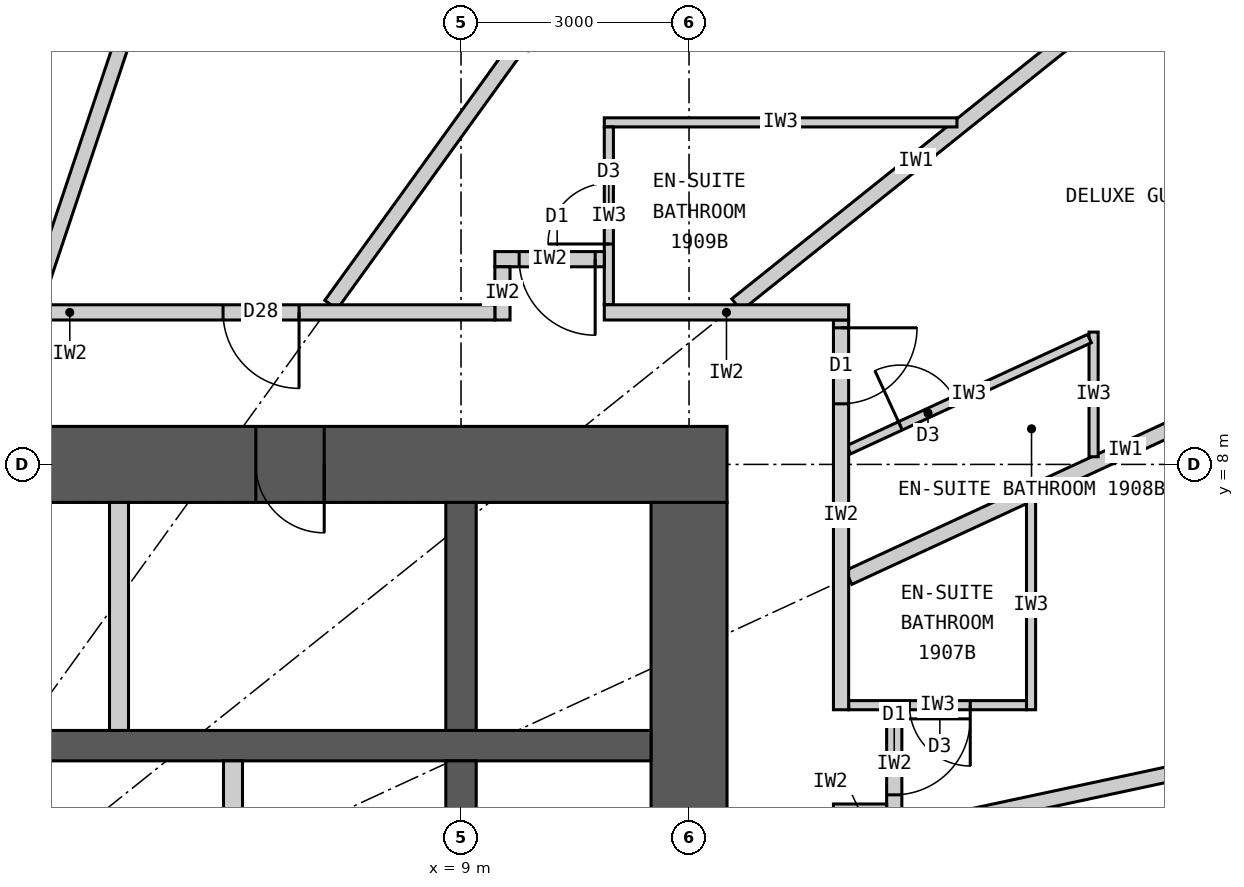
"""IFC4 building model, lengths in metres.
Left out: names, types, materials, properties, quantities, classifications, styles, units other than length and angle.
Written with IfcOpenShell. Run it as: python <this file> out.ifc"""

import sys

from ifc_helpers import new_model, si_unit, direction, frame, frame_2d, origin, place, context, subcontext, project, spatial, rectangle, extrude, element, fill, save


model = new_model("IFC4")
c1 = context("Model", 3, precision=1e-05, world=origin(), true_north=direction((0.0, 1.0)))
c2 = subcontext(c1, "Body", "Model", "MODEL_VIEW")
j1 = project(units=[si_unit("LENGTHUNIT", "METRE"), si_unit("PLANEANGLEUNIT", "RADIAN")], contexts=[c1])
p1 = place(None, origin())
s1 = spatial("IfcSite", under=j1, at=p1, CompositionType="ELEMENT")
p2 = place(p1, origin())
s2 = spatial("IfcBuilding", under=s1, at=p2, CompositionType="ELEMENT")
p3 = place(p2, frame((0.0, 0.0, 77.1)))
s3 = spatial("IfcBuildingStorey", under=s2, at=p3, CompositionType="ELEMENT", Elevation=77.1)
p4 = place(p3, frame((-12.5, 8.0, 0.0), z_axis=(0.0, 0.0, 1.0), x_axis=(1.0, 0.0, 0.0)))
e1 = element("IfcWall", 1, at=p4, inside=s3, PredefinedType="SHEAR", context=c2, shape_type="SweptSolid", body=[
    extrude(rectangle(XDim=25.0, YDim=1.0, at=frame_2d((12.5, 0.0))), origin(), (0.0, 0.0, 1.0), 3.3),
])
p5 = place(p4, frame((11.2, 0.0, 0.0)))
e2 = element("IfcOpeningElement", 2, at=p5, cuts=e1, PredefinedType="OPENING", context=c2, shape_type="SweptSolid", body=[
    extrude(rectangle(XDim=1.2, YDim=2.2, at=frame_2d((0.6, 1.1))), frame((0.0, 0.51, 0.0), z_axis=(0.0, -1.0, 0.0), x_axis=(1.0, 0.0, 0.0)), (0.0, 0.0, 1.0), 1.02),
])
p6 = place(p4, frame((18.8, 0.0, 0.0)))
e3 = element("IfcOpeningElement", 3, at=p6, cuts=e1, PredefinedType="OPENING", context=c2, shape_type="SweptSolid", body=[
    extrude(rectangle(XDim=0.9, YDim=2.2, at=frame_2d((0.45, 1.1))), frame((0.0, 0.51, 0.0), z_axis=(0.0, -1.0, 0.0), x_axis=(1.0, 0.0, 0.0)), (0.0, 0.0, 1.0), 1.02),
])
p7 = place(p3, frame((12.0, -7.5, 0.0), z_axis=(0.0, 0.0, 1.0), x_axis=(0.0, 1.0, 0.0)))
e4 = element("IfcWall", 4, at=p7, inside=s3, PredefinedType="SHEAR", context=c2, shape_type="SweptSolid", body=[
    extrude(rectangle(XDim=15.0, YDim=1.0, at=frame_2d((7.5, 0.0))), origin(), (0.0, 0.0, 1.0), 3.3),
])
p8 = place(p7, frame((6.6, 0.0, 0.0)))
e5 = element("IfcOpeningElement", 5, at=p8, cuts=e4, PredefinedType="OPENING", context=c2, shape_type="SweptSolid", body=[
    extrude(rectangle(XDim=1.8, YDim=2.2, at=frame_2d((0.9, 1.1))), frame((0.0, 0.51, 0.0), z_axis=(0.0, -1.0, 0.0), x_axis=(1.0, 0.0, 0.0)), (0.0, 0.0, 1.0), 1.02),
])
p9 = place(p3, frame((-11.5, 4.3, 0.0), z_axis=(0.0, 0.0, 1.0), x_axis=(1.0, 0.0, 0.0)))
e6 = element("IfcWall", 6, at=p9, inside=s3, PredefinedType="SHEAR", context=c2, shape_type="SweptSolid", body=[
    extrude(rectangle(XDim=23.0, YDim=0.4, at=frame_2d((11.5, 0.0))), origin(), (0.0, 0.0, 1.0), 3.3),
])
p10 = place(p3, frame((9.0, 4.5, 0.0), z_axis=(0.0, 0.0, 1.0), x_axis=(0.0, 1.0, 0.0)))
e7 = element("IfcWall", 7, at=p10, inside=s3, PredefinedType="SHEAR", context=c2, shape_type="SweptSolid", body=[
    extrude(rectangle(XDim=3.0, YDim=0.4, at=frame_2d((1.5, 0.0))), origin(), (0.0, 0.0, 1.0), 3.3),
])
p11 = place(p3, frame((9.0, 1.75, 0.0), z_axis=(0.0, 0.0, 1.0), x_axis=(0.0, 1.0, 0.0)))
e8 = element("IfcWall", 8, at=p11, inside=s3, PredefinedType="SHEAR", context=c2, shape_type="SweptSolid", body=[
    extrude(rectangle(XDim=2.35, YDim=0.4, at=frame_2d((1.175, 0.0))), origin(), (0.0, 0.0, 1.0), 3.3),
])
p12 = place(p3, frame((4.5, 4.5, 0.0), z_axis=(0.0, 0.0, 1.0), x_axis=(0.0, 1.0, 0.0)))
e9 = element("IfcWall", 9, at=p12, inside=s3, PredefinedType="PARTITIONING", context=c2, shape_type="SweptSolid", body=[
    extrude(rectangle(XDim=3.0, YDim=0.25, at=frame_2d((1.5, 0.0))), origin(), (0.0, 0.0, 1.0), 3.3),
])
p13 = place(p3, frame((6.0, 1.75, 0.0), z_axis=(0.0, 0.0, 1.0), x_axis=(0.0, 1.0, 0.0)))
e10 = element("IfcWall", 10, at=p13, inside=s3, PredefinedType="PARTITIONING", context=c2, shape_type="SweptSolid", body=[
    extrude(rectangle(XDim=2.35, YDim=0.25, at=frame_2d((1.175, 0.0))), origin(), (0.0, 0.0, 1.0), 3.3),
])
p14 = place(p3, frame((14.1, 3.022, 0.0), z_axis=(0.0, 0.0, 1.0), x_axis=(0.977790014929, 0.209586943072, 0.0)))
e11 = element("IfcWall", 11, at=p14, inside=s3, PredefinedType="PARTITIONING", context=c2, shape_type="SweptSolid", body=[
    extrude(rectangle(XDim=10.087, YDim=0.2, at=frame_2d((5.043, 0.0))), origin(), (0.0, 0.0, 1.0), 2.32),
])
p15 = place(p3, frame((14.1, 6.512, 0.0), z_axis=(0.0, 0.0, 1.0), x_axis=(0.907832871056, 0.419332181247, 0.0)))
e12 = element("IfcWall", 12, at=p15, inside=s3, PredefinedType="PARTITIONING", context=c2, shape_type="SweptSolid", body=[
    extrude(rectangle(XDim=8.023, YDim=0.2, at=frame_2d((4.011, 0.0))), origin(), (0.0, 0.0, 1.0), 2.32),
])
p16 = place(p3, frame((12.625, 10.1, 0.0), z_axis=(0.0, 0.0, 1.0), x_axis=(0.780892451574, 0.624665493744, 0.0)))
e13 = element("IfcWall", 13, at=p16, inside=s3, PredefinedType="PARTITIONING", context=c2, shape_type="SweptSolid", body=[
    extrude(rectangle(XDim=6.045, YDim=0.2, at=frame_2d((3.022, 0.0))), origin(), (0.0, 0.0, 1.0), 2.32),
])
p17 = place(p3, frame((7.289, 10.1, 0.0), z_axis=(0.0, 0.0, 1.0), x_axis=(0.585198353053, 0.810890182197, 0.0)))
e14 = element("IfcWall", 14, at=p17, inside=s3, PredefinedType="PARTITIONING", context=c2, shape_type="SweptSolid", body=[
    extrude(rectangle(XDim=8.36, YDim=0.2, at=frame_2d((4.18, 0.0))), origin(), (0.0, 0.0, 1.0), 2.32),
])
p18 = place(p3, frame((3.383, 10.1, 0.0), z_axis=(0.0, 0.0, 1.0), x_axis=(0.31759592231, 0.948226149256, 0.0)))
e15 = element("IfcWall", 15, at=p18, inside=s3, PredefinedType="PARTITIONING", context=c2, shape_type="SweptSolid", body=[
    extrude(rectangle(XDim=9.098, YDim=0.2, at=frame_2d((4.549, 0.0))), origin(), (0.0, 0.0, 1.0), 2.32),
])
p19 = place(p3, frame((16.5, 7.521, 0.0), z_axis=(0.0, 0.0, 1.0), x_axis=(0.0, -1.0, 0.0)))
e16 = element("IfcWall", 16, at=p19, inside=s3, PredefinedType="PARTITIONING", context=c2, shape_type="SweptSolid", body=[
    extrude(rectangle(XDim=2.749, YDim=0.12, at=frame_2d((1.374, 0.0))), origin(), (0.0, 0.0, 1.0), 3.12),
])
p20 = place(p3, frame((14.1, 4.833, 0.0), z_axis=(0.0, 0.0, 1.0), x_axis=(1.0, 0.0, 0.0)))
e17 = element("IfcWall", 17, at=p20, inside=s3, PredefinedType="PARTITIONING", context=c2, shape_type="SweptSolid", body=[
    extrude(rectangle(XDim=2.34, YDim=0.12, at=frame_2d((1.17, 0.0))), origin(), (0.0, 0.0, 1.0), 3.12),
])
p21 = place(p20, frame((0.8, 0.0, 0.0)))
e18 = element("IfcOpeningElement", 18, at=p21, cuts=e17, PredefinedType="OPENING", context=c2, shape_type="SweptSolid", body=[
    extrude(rectangle(XDim=0.8, YDim=2.1, at=frame_2d((0.4, 1.05))), frame((0.0, 0.07, 0.0), z_axis=(0.0, -1.0, 0.0), x_axis=(1.0, 0.0, 0.0)), (0.0, 0.0, 1.0), 0.14),
])
p22 = place(p3, frame((17.323, 8.101, 0.0), z_axis=(0.0, 0.0, 1.0), x_axis=(0.0, 1.0, 0.0)))
e19 = element("IfcWall", 19, at=p22, inside=s3, PredefinedType="PARTITIONING", context=c2, shape_type="SweptSolid", body=[
    extrude(rectangle(XDim=1.64, YDim=0.12, at=frame_2d((0.82, 0.0))), origin(), (0.0, 0.0, 1.0), 3.12),
])
p23 = place(p3, frame((14.1, 8.193, 0.0), z_axis=(0.0, 0.0, 1.0), x_axis=(0.907836493557, 0.419324338628, 0.0)))
e20 = element("IfcWall", 20, at=p23, inside=s3, PredefinedType="PARTITIONING", context=c2, shape_type="SweptSolid", body=[
    extrude(rectangle(XDim=3.49, YDim=0.12, at=frame_2d((1.745, 0.0))), origin(), (0.0, 0.0, 1.0), 3.12),
])
p24 = place(p23, frame((0.75, 0.0, 0.0)))
e21 = element("IfcOpeningElement", 21, at=p24, cuts=e20, PredefinedType="OPENING", context=c2, shape_type="SweptSolid", body=[
    extrude(rectangle(XDim=0.8, YDim=2.1, at=frame_2d((0.4, 1.05))), frame((0.0, 0.07, 0.0), z_axis=(0.0, -1.0, 0.0), x_axis=(1.0, 0.0, 0.0)), (0.0, 0.0, 1.0), 0.14),
])
p25 = place(p3, frame((15.525, 12.5, 0.0), z_axis=(0.0, 0.0, 1.0), x_axis=(-1.0, 0.0, 0.0)))
e22 = element("IfcWall", 22, at=p25, inside=s3, PredefinedType="PARTITIONING", context=c2, shape_type="SweptSolid", body=[
    extrude(rectangle(XDim=4.64, YDim=0.12, at=frame_2d((2.32, 0.0))), origin(), (0.0, 0.0, 1.0), 3.12),
])
p26 = place(p3, frame((10.945, 10.1, 0.0), z_axis=(0.0, 0.0, 1.0), x_axis=(0.0, 1.0, 0.0)))
e23 = element("IfcWall", 23, at=p26, inside=s3, PredefinedType="PARTITIONING", context=c2, shape_type="SweptSolid", body=[
    extrude(rectangle(XDim=2.34, YDim=0.12, at=frame_2d((1.17, 0.0))), origin(), (0.0, 0.0, 1.0), 3.12),
])
p27 = place(p26, frame((0.8, 0.0, 0.0)))
e24 = element("IfcOpeningElement", 24, at=p27, cuts=e23, PredefinedType="OPENING", context=c2, shape_type="SweptSolid", body=[
    extrude(rectangle(XDim=0.8, YDim=2.1, at=frame_2d((0.4, 1.05))), frame((0.0, 0.07, 0.0), z_axis=(0.0, -1.0, 0.0), x_axis=(1.0, 0.0, 0.0)), (0.0, 0.0, 1.0), 0.14),
])
p28 = place(p3, frame((14.7, 3.333, 0.0), z_axis=(0.0, 0.0, 1.0), x_axis=(0.0, 1.0, 0.0)))
e25 = element("IfcWall", 25, at=p28, inside=s3, PredefinedType="PARTITIONING", context=c2, shape_type="SweptSolid", body=[
    extrude(rectangle(XDim=1.44, YDim=0.2, at=frame_2d((0.72, 0.0))), origin(), (0.0, 0.0, 1.0), 3.12),
])
p29 = place(p28, frame((0.32, 0.0, 0.0)))
e26 = element("IfcOpeningElement", 26, at=p29, cuts=e25, PredefinedType="OPENING", context=c2, shape_type="SweptSolid", body=[
    extrude(rectangle(XDim=1.0, YDim=2.2, at=frame_2d((0.5, 1.1))), frame((0.0, 0.11, 0.0), z_axis=(0.0, -1.0, 0.0), x_axis=(1.0, 0.0, 0.0)), (0.0, 0.0, 1.0), 0.22),
])
p30 = place(p3, frame((13.9, 3.433, 0.0), z_axis=(0.0, 0.0, 1.0), x_axis=(1.0, 0.0, 0.0)))
e27 = element("IfcWall", 27, at=p30, inside=s3, PredefinedType="PARTITIONING", context=c2, shape_type="SweptSolid", body=[
    extrude(rectangle(XDim=0.7, YDim=0.2, at=frame_2d((0.35, 0.0))), origin(), (0.0, 0.0, 1.0), 2.32),
])
p31 = place(p3, frame((9.445, 10.7, 0.0), z_axis=(0.0, 0.0, 1.0), x_axis=(1.0, 0.0, 0.0)))
e28 = element("IfcWall", 28, at=p31, inside=s3, PredefinedType="PARTITIONING", context=c2, shape_type="SweptSolid", body=[
    extrude(rectangle(XDim=1.44, YDim=0.2, at=frame_2d((0.72, 0.0))), origin(), (0.0, 0.0, 1.0), 3.12),
])
p32 = place(p31, frame((0.32, 0.0, 0.0)))
e29 = element("IfcOpeningElement", 29, at=p32, cuts=e28, PredefinedType="OPENING", context=c2, shape_type="SweptSolid", body=[
    extrude(rectangle(XDim=1.0, YDim=2.2, at=frame_2d((0.5, 1.1))), frame((0.0, 0.11, 0.0), z_axis=(0.0, -1.0, 0.0), x_axis=(1.0, 0.0, 0.0)), (0.0, 0.0, 1.0), 0.22),
])
p33 = place(p3, frame((9.545, 9.9, 0.0), z_axis=(0.0, 0.0, 1.0), x_axis=(0.0, 1.0, 0.0)))
e30 = element("IfcWall", 30, at=p33, inside=s3, PredefinedType="PARTITIONING", context=c2, shape_type="SweptSolid", body=[
    extrude(rectangle(XDim=0.7, YDim=0.2, at=frame_2d((0.35, 0.0))), origin(), (0.0, 0.0, 1.0), 3.12),
])
p34 = place(p3, frame((14.0, 4.772, 0.0), z_axis=(0.0, 0.0, 1.0), x_axis=(0.0, 1.0, 0.0)))
e31 = element("IfcWall", 31, at=p34, inside=s3, PredefinedType="PARTITIONING", context=c2, shape_type="SweptSolid", body=[
    extrude(rectangle(XDim=5.127, YDim=0.2, at=frame_2d((2.564, 0.0))), origin(), (0.0, 0.0, 1.0), 3.12),
])
p35 = place(p34, frame((4.025, 0.0, 0.0)))
e32 = element("IfcOpeningElement", 32, at=p35, cuts=e31, PredefinedType="OPENING", context=c2, shape_type="SweptSolid", body=[
    extrude(rectangle(XDim=1.0, YDim=2.2, at=frame_2d((0.5, 1.1))), frame((0.0, 0.11, 0.0), z_axis=(0.0, -1.0, 0.0), x_axis=(1.0, 0.0, 0.0)), (0.0, 0.0, 1.0), 0.22),
])
p36 = place(p3, frame((-1.74, 10.0, 0.0), z_axis=(0.0, 0.0, 1.0), x_axis=(1.0, 0.0, 0.0)))
e33 = element("IfcWall", 33, at=p36, inside=s3, PredefinedType="PARTITIONING", context=c2, shape_type="SweptSolid", body=[
    extrude(rectangle(XDim=11.185, YDim=0.2, at=frame_2d((5.593, 0.0))), origin(), (0.0, 0.0, 1.0), 3.12),
])
p37 = place(p36, frame((7.609, 0.0, 0.0)))
e34 = element("IfcOpeningElement", 34, at=p37, cuts=e33, PredefinedType="OPENING", context=c2, shape_type="SweptSolid", body=[
    extrude(rectangle(XDim=1.0, YDim=2.2, at=frame_2d((0.5, 1.1))), frame((0.0, 0.11, 0.0), z_axis=(0.0, -1.0, 0.0), x_axis=(1.0, 0.0, 0.0)), (0.0, 0.0, 1.0), 0.22),
])
p38 = place(p36, frame((3.703, 0.0, 0.0)))
e35 = element("IfcOpeningElement", 35, at=p38, cuts=e33, PredefinedType="OPENING", context=c2, shape_type="SweptSolid", body=[
    extrude(rectangle(XDim=1.0, YDim=2.2, at=frame_2d((0.5, 1.1))), frame((0.0, 0.11, 0.0), z_axis=(0.0, -1.0, 0.0), x_axis=(1.0, 0.0, 0.0)), (0.0, 0.0, 1.0), 0.22),
])
p39 = place(p3, frame((10.885, 10.0, 0.0), z_axis=(0.0, 0.0, 1.0), x_axis=(1.0, 0.0, 0.0)))
e36 = element("IfcWall", 36, at=p39, inside=s3, PredefinedType="PARTITIONING", context=c2, shape_type="SweptSolid", body=[
    extrude(rectangle(XDim=3.215, YDim=0.2, at=frame_2d((1.607, 0.0))), origin(), (0.0, 0.0, 1.0), 3.12),
])
p40 = place(p21, origin())
e37 = element("IfcDoor", 37, at=p40, inside=s3, OperationType="SINGLE_SWING_RIGHT", PredefinedType="DOOR", context=c2, shape_type="SweptSolid", body=[
    extrude(rectangle(XDim=0.8, YDim=2.1, at=frame_2d((0.4, 1.05))), frame((0.0, 0.025, 0.0), z_axis=(0.0, -1.0, 0.0), x_axis=(1.0, 0.0, 0.0)), (0.0, 0.0, 1.0), 0.05),
])
fill(e18, e37)
p41 = place(p29, origin())
e38 = element("IfcDoor", 38, at=p41, inside=s3, OperationType="SINGLE_SWING_RIGHT", PredefinedType="DOOR", context=c2, shape_type="SweptSolid", body=[
    extrude(rectangle(XDim=1.0, YDim=2.2, at=frame_2d((0.5, 1.1))), frame((0.0, 0.025, 0.0), z_axis=(0.0, -1.0, 0.0), x_axis=(1.0, 0.0, 0.0)), (0.0, 0.0, 1.0), 0.05),
])
fill(e26, e38)
p42 = place(p24, origin())
e39 = element("IfcDoor", 39, at=p42, inside=s3, OperationType="SINGLE_SWING_LEFT", PredefinedType="DOOR", context=c2, shape_type="SweptSolid", body=[
    extrude(rectangle(XDim=0.8, YDim=2.1, at=frame_2d((0.4, 1.05))), frame((0.0, 0.025, 0.0), z_axis=(0.0, -1.0, 0.0), x_axis=(1.0, 0.0, 0.0)), (0.0, 0.0, 1.0), 0.05),
])
fill(e21, e39)
p43 = place(p35, origin())
e40 = element("IfcDoor", 40, at=p43, inside=s3, OperationType="SINGLE_SWING_RIGHT", PredefinedType="DOOR", context=c2, shape_type="SweptSolid", body=[
    extrude(rectangle(XDim=1.0, YDim=2.2, at=frame_2d((0.5, 1.1))), frame((0.0, 0.025, 0.0), z_axis=(0.0, -1.0, 0.0), x_axis=(1.0, 0.0, 0.0)), (0.0, 0.0, 1.0), 0.05),
])
fill(e32, e40)
p44 = place(p27, origin())
e41 = element("IfcDoor", 41, at=p44, inside=s3, OperationType="SINGLE_SWING_LEFT", PredefinedType="DOOR", context=c2, shape_type="SweptSolid", body=[
    extrude(rectangle(XDim=0.8, YDim=2.1, at=frame_2d((0.4, 1.05))), frame((0.0, 0.025, 0.0), z_axis=(0.0, -1.0, 0.0), x_axis=(1.0, 0.0, 0.0)), (0.0, 0.0, 1.0), 0.05),
])
fill(e24, e41)
p45 = place(p32, origin())
e42 = element("IfcDoor", 42, at=p45, inside=s3, OperationType="SINGLE_SWING_RIGHT", PredefinedType="DOOR", context=c2, shape_type="SweptSolid", body=[
    extrude(rectangle(XDim=1.0, YDim=2.2, at=frame_2d((0.5, 1.1))), frame((0.0, 0.025, 0.0), z_axis=(0.0, -1.0, 0.0), x_axis=(1.0, 0.0, 0.0)), (0.0, 0.0, 1.0), 0.05),
])
fill(e29, e42)
p46 = place(p37, origin())
e43 = element("IfcDoor", 43, at=p46, inside=s3, OperationType="SINGLE_SWING_RIGHT", PredefinedType="DOOR", context=c2, shape_type="SweptSolid", body=[
    extrude(rectangle(XDim=1.0, YDim=2.2, at=frame_2d((0.5, 1.1))), frame((0.0, 0.025, 0.0), z_axis=(0.0, -1.0, 0.0), x_axis=(1.0, 0.0, 0.0)), (0.0, 0.0, 1.0), 0.05),
])
fill(e34, e43)
p47 = place(p6, origin())
e44 = element("IfcDoor", 44, at=p47, inside=s3, OperationType="SINGLE_SWING_RIGHT", PredefinedType="DOOR", context=c2, shape_type="SweptSolid", body=[
    extrude(rectangle(XDim=0.9, YDim=2.2, at=frame_2d((0.45, 1.1))), frame((0.0, 0.025, 0.0), z_axis=(0.0, -1.0, 0.0), x_axis=(1.0, 0.0, 0.0)), (0.0, 0.0, 1.0), 0.05),
])
fill(e3, e44)
save(model, sys.argv[1])
